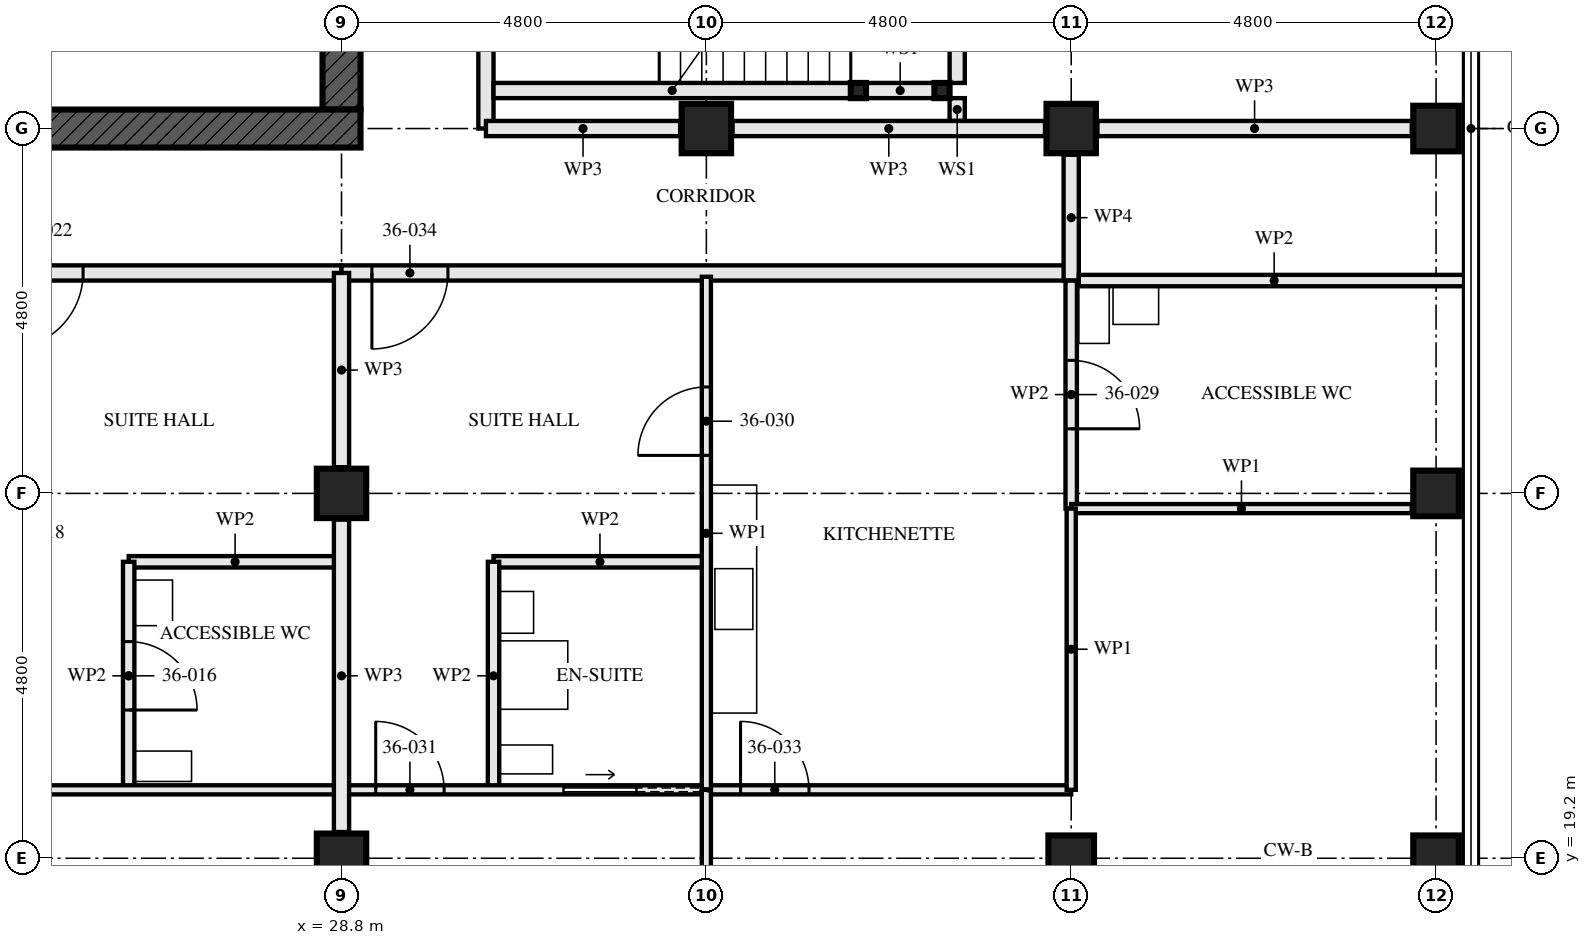
"""IFC4 building model, lengths in metres.
Left out: names, types, materials, properties, quantities, classifications, styles, units other than length and angle.
Written with IfcOpenShell. Run it as: python <this file> out.ifc"""

import sys

from ifc_helpers import new_model, si_unit, direction, frame, frame_2d, origin, origin_2d, place, context, subcontext, project, spatial, rectangle, hollow_rectangle, extrude, element, fill, save


model = new_model("IFC4")
c1 = context("Model", 3, precision=1e-05, world=origin(), true_north=direction((0.0, 1.0)))
c2 = subcontext(c1, "Body", "Model", "MODEL_VIEW")
j1 = project(units=[si_unit("LENGTHUNIT", "METRE"), si_unit("PLANEANGLEUNIT", "RADIAN")], contexts=[c1])
p1 = place(None, origin())
s1 = spatial("IfcSite", under=j1, at=p1, CompositionType="ELEMENT")
p2 = place(p1, origin())
s2 = spatial("IfcBuilding", under=s1, at=p2, CompositionType="ELEMENT")
p3 = place(p2, frame((0.0, 0.0, 133.0)))
s3 = spatial("IfcBuildingStorey", under=s2, at=p3, CompositionType="ELEMENT", Elevation=133.0)
for number, where, z_axis, x_axis in (
    (1, (28.8, 19.2, 0.0), (0.0, 0.0, 1.0), (1.0, 0.0, 0.0)),
    (2, (28.8, 24.0, 0.0), (0.0, 0.0, 1.0), (1.0, 0.0, 0.0)),
    (3, (33.6, 28.8, 0.0), (0.0, 0.0, 1.0), (0.0, 1.0, 0.0)),
):
    element("IfcColumn", number, at=place(p3, frame(where, z_axis=z_axis, x_axis=x_axis)), inside=s3, PredefinedType="COLUMN", context=c2, shape_type="SweptSolid", body=[
        extrude(hollow_rectangle(XDim=0.65, YDim=0.65, WallThickness=0.05, at=origin_2d()), origin(), (0.0, 0.0, 1.0), 3.5),
    ])
p4 = place(p3, frame((38.4, 19.2, 0.0), z_axis=(0.0, 0.0, 1.0), x_axis=(0.0, 1.0, 0.0)))
e4 = element("IfcColumn", 4, at=p4, inside=s3, PredefinedType="COLUMN", context=c2, shape_type="SweptSolid", body=[
    extrude(hollow_rectangle(XDim=0.6, YDim=0.6, WallThickness=0.08, at=origin_2d()), origin(), (0.0, 0.0, 1.0), 3.5),
])
p5 = place(p3, frame((38.4, 28.8, 0.0), z_axis=(0.0, 0.0, 1.0), x_axis=(0.0, 1.0, 0.0)))
e5 = element("IfcColumn", 5, at=p5, inside=s3, PredefinedType="COLUMN", context=c2, shape_type="SweptSolid", body=[
    extrude(hollow_rectangle(XDim=0.65, YDim=0.65, WallThickness=0.05, at=origin_2d()), origin(), (0.0, 0.0, 1.0), 3.5),
])
for number, where, z_axis, x_axis in (
    (6, (43.2, 19.2, 0.0), (0.0, 0.0, 1.0), (0.0, 1.0, 0.0)),
    (7, (43.2, 24.0, 0.0), (0.0, 0.0, 1.0), (1.0, 0.0, 0.0)),
    (8, (43.2, 28.8, 0.0), (0.0, 0.0, 1.0), (0.0, 1.0, 0.0)),
):
    element("IfcColumn", number, at=place(p3, frame(where, z_axis=z_axis, x_axis=x_axis)), inside=s3, PredefinedType="COLUMN", context=c2, shape_type="SweptSolid", body=[
        extrude(hollow_rectangle(XDim=0.6, YDim=0.6, WallThickness=0.08, at=origin_2d()), origin(), (0.0, 0.0, 1.0), 3.5),
    ])
p6 = place(p3, frame((14.15, 28.8, -0.17), z_axis=(0.0, 0.0, 1.0), x_axis=(1.0, 0.0, 0.0)))
e9 = element("IfcWall", 9, at=p6, inside=s3, PredefinedType="SHEAR", context=c2, shape_type="SweptSolid", body=[
    extrude(rectangle(XDim=14.9, YDim=0.5, at=frame_2d((7.45, 0.0))), origin(), (0.0, 0.0, 1.0), 3.42),
])
p7 = place(p6, frame((6.85, 0.0, 0.17)))
e10 = element("IfcOpeningElement", 10, at=p7, cuts=e9, PredefinedType="OPENING", context=c2, shape_type="SweptSolid", body=[
    extrude(rectangle(XDim=1.2, YDim=2.1, at=frame_2d((0.6, 1.05))), frame((0.0, 0.26, 0.0), z_axis=(0.0, -1.0, 0.0), x_axis=(1.0, 0.0, 0.0)), (0.0, 0.0, 1.0), 0.521),
])
p8 = place(p3, frame((28.8, 29.05, -0.17), z_axis=(0.0, 0.0, 1.0), x_axis=(0.0, 1.0, 0.0)))
e11 = element("IfcWall", 11, at=p8, inside=s3, PredefinedType="SHEAR", context=c2, shape_type="SweptSolid", body=[
    extrude(rectangle(XDim=13.9, YDim=0.5, at=frame_2d((6.95, 0.0))), origin(), (0.0, 0.0, 1.0), 3.42),
])
p9 = place(p8, frame((6.35, 0.0, 0.17)))
e12 = element("IfcOpeningElement", 12, at=p9, cuts=e11, PredefinedType="OPENING", context=c2, shape_type="SweptSolid", body=[
    extrude(rectangle(XDim=1.2, YDim=2.1, at=frame_2d((0.6, 1.05))), frame((0.0, 0.26, 0.0), z_axis=(0.0, -1.0, 0.0), x_axis=(1.0, 0.0, 0.0)), (0.0, 0.0, 1.0), 0.521),
])
for number, where, z_axis, x_axis in (
    (13, (36.7, 29.3, 0.0), (0.0, 0.0, 1.0), (1.0, 0.0, 0.0)),
    (14, (35.6, 29.3, 0.0), (0.0, 0.0, 1.0), (1.0, 0.0, 0.0)),
):
    element("IfcColumn", number, at=place(p3, frame(where, z_axis=z_axis, x_axis=x_axis)), inside=s3, PredefinedType="COLUMN", context=c2, shape_type="SweptSolid", body=[
        extrude(hollow_rectangle(XDim=0.2, YDim=0.2, WallThickness=0.008, at=origin_2d()), origin(), (0.0, 0.0, 1.0), 3.25),
    ])
p10 = place(p3, frame((26.0, 20.1, 0.0), z_axis=(0.0, 0.0, 1.0), x_axis=(0.0, 1.0, 0.0)))
e15 = element("IfcWall", 15, at=p10, inside=s3, PredefinedType="PARTITIONING", context=c2, shape_type="SweptSolid", body=[
    extrude(rectangle(XDim=3.0, YDim=0.15, at=frame_2d((1.5, 0.0))), origin(), (0.0, 0.0, 1.0), 3.25),
])
p11 = place(p10, frame((1.05, 0.0, 0.0)))
e16 = element("IfcOpeningElement", 16, at=p11, cuts=e15, PredefinedType="OPENING", context=c2, shape_type="SweptSolid", body=[
    extrude(rectangle(XDim=0.9, YDim=2.1, at=frame_2d((0.45, 1.05))), frame((0.0, 0.085, 0.0), z_axis=(0.0, -1.0, 0.0), x_axis=(1.0, 0.0, 0.0)), (0.0, 0.0, 1.0), 0.171),
])
p12 = place(p3, frame((26.0, 23.1, 0.0), z_axis=(0.0, 0.0, 1.0), x_axis=(1.0, 0.0, 0.0)))
e17 = element("IfcWall", 17, at=p12, inside=s3, PredefinedType="PARTITIONING", context=c2, shape_type="SweptSolid", body=[
    extrude(rectangle(XDim=2.8, YDim=0.15, at=frame_2d((1.4, 0.0))), origin(), (0.0, 0.0, 1.0), 3.25),
])
p13 = place(p3, frame((24.0, 20.1, 0.0), z_axis=(0.0, 0.0, 1.0), x_axis=(1.0, 0.0, 0.0)))
e18 = element("IfcWall", 18, at=p13, inside=s3, PredefinedType="PARTITIONING", context=c2, shape_type="SweptSolid", body=[
    extrude(rectangle(XDim=4.8, YDim=0.12, at=frame_2d((2.4, 0.0))), origin(), (0.0, 0.0, 1.0), 3.25),
])
p14 = place(p3, frame((13.96, 26.9, 0.0), z_axis=(0.0, 0.0, 1.0), x_axis=(1.0, 0.0, 0.0)))
e19 = element("IfcWall", 19, at=p14, inside=s3, PredefinedType="PARTITIONING", context=c2, shape_type="SweptSolid", body=[
    extrude(rectangle(XDim=14.84, YDim=0.2, at=frame_2d((7.42, 0.0))), origin(), (0.0, 0.0, 1.0), 2.04),
])
p15 = place(p14, frame((1.84, 0.0, 0.0)))
e20 = element("IfcOpeningElement", 20, at=p15, cuts=e19, PredefinedType="OPENING", context=c2, shape_type="SweptSolid", body=[
    extrude(rectangle(XDim=1.0, YDim=2.0, at=frame_2d((0.5, 1.0))), frame((0.0, 0.111, 0.0), z_axis=(0.0, -1.0, 0.0), x_axis=(1.0, 0.0, 0.0)), (0.0, 0.0, 1.0), 0.221),
])
p16 = place(p14, frame((10.44, 0.0, 0.0)))
e21 = element("IfcOpeningElement", 21, at=p16, cuts=e19, PredefinedType="OPENING", context=c2, shape_type="SweptSolid", body=[
    extrude(rectangle(XDim=1.0, YDim=2.0, at=frame_2d((0.5, 1.0))), frame((0.0, 0.111, 0.0), z_axis=(0.0, -1.0, 0.0), x_axis=(1.0, 0.0, 0.0)), (0.0, 0.0, 1.0), 0.221),
])
p17 = place(p3, frame((30.8, 20.1, 0.0), z_axis=(0.0, 0.0, 1.0), x_axis=(0.0, 1.0, 0.0)))
e22 = element("IfcWall", 22, at=p17, inside=s3, PredefinedType="PARTITIONING", context=c2, shape_type="SweptSolid", body=[
    extrude(rectangle(XDim=3.0, YDim=0.15, at=frame_2d((1.5, 0.0))), origin(), (0.0, 0.0, 1.0), 3.25),
])
p18 = place(p3, frame((30.8, 23.1, 0.0), z_axis=(0.0, 0.0, 1.0), x_axis=(1.0, 0.0, 0.0)))
e23 = element("IfcWall", 23, at=p18, inside=s3, PredefinedType="PARTITIONING", context=c2, shape_type="SweptSolid", body=[
    extrude(rectangle(XDim=2.8, YDim=0.15, at=frame_2d((1.4, 0.0))), origin(), (0.0, 0.0, 1.0), 3.25),
])
p19 = place(p3, frame((38.4, 23.8, 0.0), z_axis=(0.0, 0.0, 1.0), x_axis=(0.0, 1.0, 0.0)))
e24 = element("IfcWall", 24, at=p19, inside=s3, PredefinedType="PARTITIONING", context=c2, shape_type="SweptSolid", body=[
    extrude(rectangle(XDim=3.0, YDim=0.15, at=frame_2d((1.5, 0.0))), origin(), (0.0, 0.0, 1.0), 2.04),
])
p20 = place(p19, frame((1.05, 0.0, 0.0)))
e25 = element("IfcOpeningElement", 25, at=p20, cuts=e24, PredefinedType="OPENING", context=c2, shape_type="SweptSolid", body=[
    extrude(rectangle(XDim=0.9, YDim=2.0, at=frame_2d((0.45, 1.0))), frame((0.0, 0.085, 0.0), z_axis=(0.0, -1.0, 0.0), x_axis=(1.0, 0.0, 0.0)), (0.0, 0.0, 1.0), 0.171),
])
p21 = place(p3, frame((33.6, 20.1, 0.0), z_axis=(0.0, 0.0, 1.0), x_axis=(0.0, 1.0, 0.0)))
e26 = element("IfcWall", 26, at=p21, inside=s3, PredefinedType="PARTITIONING", context=c2, shape_type="SweptSolid", body=[
    extrude(rectangle(XDim=6.75, YDim=0.12, at=frame_2d((3.375, 0.0))), origin(), (0.0, 0.0, 1.0), 2.04),
])
p22 = place(p21, frame((4.4, 0.0, 0.0)))
e27 = element("IfcOpeningElement", 27, at=p22, cuts=e26, PredefinedType="OPENING", context=c2, shape_type="SweptSolid", body=[
    extrude(rectangle(XDim=0.9, YDim=2.0, at=frame_2d((0.45, 1.0))), frame((0.0, 0.071, 0.0), z_axis=(0.0, -1.0, 0.0), x_axis=(1.0, 0.0, 0.0)), (0.0, 0.0, 1.0), 0.141),
])
p23 = place(p3, frame((28.8, 20.1, 0.0), z_axis=(0.0, 0.0, 1.0), x_axis=(1.0, 0.0, 0.0)))
e28 = element("IfcWall", 28, at=p23, inside=s3, PredefinedType="PARTITIONING", context=c2, shape_type="SweptSolid", body=[
    extrude(rectangle(XDim=4.8, YDim=0.12, at=frame_2d((2.4, 0.0))), origin(), (0.0, 0.0, 1.0), 3.25),
])
p24 = place(p23, frame((0.45, 0.0, 0.0)))
e29 = element("IfcOpeningElement", 29, at=p24, cuts=e28, PredefinedType="OPENING", context=c2, shape_type="SweptSolid", body=[
    extrude(rectangle(XDim=0.9, YDim=2.1, at=frame_2d((0.45, 1.05))), frame((0.0, 0.071, 0.0), z_axis=(0.0, -1.0, 0.0), x_axis=(1.0, 0.0, 0.0)), (0.0, 0.0, 1.0), 0.141),
])
p25 = place(p23, frame((2.925, 0.0, 0.0)))
e30 = element("IfcOpeningElement", 30, at=p25, cuts=e28, PredefinedType="OPENING", context=c2, shape_type="SweptSolid", body=[
    extrude(rectangle(XDim=0.95, YDim=2.1, at=frame_2d((0.475, 1.05))), frame((0.0, 0.071, 0.0), z_axis=(0.0, -1.0, 0.0), x_axis=(1.0, 0.0, 0.0)), (0.0, 0.0, 1.0), 0.141),
])
p26 = place(p3, frame((33.6, 20.1, 0.0), z_axis=(0.0, 0.0, 1.0), x_axis=(1.0, 0.0, 0.0)))
e31 = element("IfcWall", 31, at=p26, inside=s3, PredefinedType="PARTITIONING", context=c2, shape_type="SweptSolid", body=[
    extrude(rectangle(XDim=4.8, YDim=0.12, at=frame_2d((2.4, 0.0))), origin(), (0.0, 0.0, 1.0), 3.25),
])
p27 = place(p26, frame((0.45, 0.0, 0.0)))
e32 = element("IfcOpeningElement", 32, at=p27, cuts=e31, PredefinedType="OPENING", context=c2, shape_type="SweptSolid", body=[
    extrude(rectangle(XDim=0.9, YDim=2.1, at=frame_2d((0.45, 1.05))), frame((0.0, 0.071, 0.0), z_axis=(0.0, -1.0, 0.0), x_axis=(1.0, 0.0, 0.0)), (0.0, 0.0, 1.0), 0.141),
])
p28 = place(p3, frame((38.4, 23.8, 0.0), z_axis=(0.0, 0.0, 1.0), x_axis=(1.0, 0.0, 0.0)))
e33 = element("IfcWall", 33, at=p28, inside=s3, PredefinedType="PARTITIONING", context=c2, shape_type="SweptSolid", body=[
    extrude(rectangle(XDim=4.48, YDim=0.12, at=frame_2d((2.24, 0.0))), origin(), (0.0, 0.0, 1.0), 2.04),
])
p29 = place(p3, frame((33.6, 14.72, 0.0), z_axis=(0.0, 0.0, 1.0), x_axis=(0.0, 1.0, 0.0)))
e34 = element("IfcWall", 34, at=p29, inside=s3, PredefinedType="PARTITIONING", context=c2, shape_type="SweptSolid", body=[
    extrude(rectangle(XDim=5.38, YDim=0.12, at=frame_2d((2.69, 0.0))), origin(), (0.0, 0.0, 1.0), 2.24),
])
p30 = place(p3, frame((38.4, 20.1, 0.0), z_axis=(0.0, 0.0, 1.0), x_axis=(0.0, 1.0, 0.0)))
e35 = element("IfcWall", 35, at=p30, inside=s3, PredefinedType="PARTITIONING", context=c2, shape_type="SweptSolid", body=[
    extrude(rectangle(XDim=3.7, YDim=0.12, at=frame_2d((1.85, 0.0))), origin(), (0.0, 0.0, 1.0), 3.25),
])
p31 = place(p3, frame((28.8, 26.9, 0.0), z_axis=(0.0, 0.0, 1.0), x_axis=(1.0, 0.0, 0.0)))
e36 = element("IfcWall", 36, at=p31, inside=s3, PredefinedType="PARTITIONING", context=c2, shape_type="SweptSolid", body=[
    extrude(rectangle(XDim=9.6, YDim=0.2, at=frame_2d((4.8, 0.0))), origin(), (0.0, 0.0, 1.0), 3.25),
])
p32 = place(p31, frame((0.4, 0.0, 0.0)))
e37 = element("IfcOpeningElement", 37, at=p32, cuts=e36, PredefinedType="OPENING", context=c2, shape_type="SweptSolid", body=[
    extrude(rectangle(XDim=1.0, YDim=2.1, at=frame_2d((0.5, 1.05))), frame((0.0, 0.111, 0.0), z_axis=(0.0, -1.0, 0.0), x_axis=(1.0, 0.0, 0.0)), (0.0, 0.0, 1.0), 0.221),
])
p33 = place(p3, frame((38.4, 26.8, 0.0), z_axis=(0.0, 0.0, 1.0), x_axis=(0.0, 1.0, 0.0)))
e38 = element("IfcWall", 38, at=p33, inside=s3, PredefinedType="PARTITIONING", context=c2, shape_type="SweptSolid", body=[
    extrude(rectangle(XDim=1.655, YDim=0.2, at=frame_2d((0.828, 0.0))), origin(), (0.0, 0.0, 1.0), 3.25),
])
p34 = place(p3, frame((36.6, 29.3, 0.0), z_axis=(0.0, 0.0, 1.0), x_axis=(-1.0, 0.0, 0.0)))
e39 = element("IfcWall", 39, at=p34, inside=s3, PredefinedType="SOLIDWALL", context=c2, shape_type="SweptSolid", body=[
    extrude(rectangle(XDim=0.9, YDim=0.2, at=frame_2d((0.45, 0.0))), origin(), (0.0, 0.0, 1.0), 2.94),
])
p35 = place(p3, frame((35.5, 29.3, 0.0), z_axis=(0.0, 0.0, 1.0), x_axis=(-1.0, 0.0, 0.0)))
e40 = element("IfcWall", 40, at=p35, inside=s3, PredefinedType="SOLIDWALL", context=c2, shape_type="SweptSolid", body=[
    extrude(rectangle(XDim=4.7, YDim=0.2, at=frame_2d((2.35, 0.0))), origin(), (0.0, 0.0, 1.0), 2.94),
])
p36 = place(p3, frame((36.9, 28.9, 0.0), z_axis=(0.0, 0.0, 1.0), x_axis=(0.0, 1.0, 0.0)))
e41 = element("IfcWall", 41, at=p36, inside=s3, PredefinedType="SOLIDWALL", context=c2, shape_type="SweptSolid", body=[
    extrude(rectangle(XDim=0.3, YDim=0.2, at=frame_2d((0.15, 0.0))), origin(), (0.0, 0.0, 1.0), 3.25),
])
p37 = place(p3, frame((36.9, 29.4, 0.0), z_axis=(0.0, 0.0, 1.0), x_axis=(0.0, 1.0, 0.0)))
e42 = element("IfcWall", 42, at=p37, inside=s3, PredefinedType="SOLIDWALL", context=c2, shape_type="SweptSolid", body=[
    extrude(rectangle(XDim=2.6, YDim=0.2, at=frame_2d((1.3, 0.0))), origin(), (0.0, 0.0, 1.0), 3.25),
])
p38 = place(p3, frame((30.7, 28.8, 0.0), z_axis=(0.0, 0.0, 1.0), x_axis=(0.0, 1.0, 0.0)))
e43 = element("IfcWall", 43, at=p38, inside=s3, PredefinedType="PARTITIONING", context=c2, shape_type="SweptSolid", body=[
    extrude(rectangle(XDim=14.84, YDim=0.2, at=frame_2d((7.42, 0.0))), origin(), (0.0, 0.0, 1.0), 2.04),
])
p39 = place(p38, frame((1.4, 0.0, 0.0)))
e44 = element("IfcOpeningElement", 44, at=p39, cuts=e43, PredefinedType="OPENING", context=c2, shape_type="SweptSolid", body=[
    extrude(rectangle(XDim=1.0, YDim=2.0, at=frame_2d((0.5, 1.0))), frame((0.0, 0.111, 0.0), z_axis=(0.0, -1.0, 0.0), x_axis=(1.0, 0.0, 0.0)), (0.0, 0.0, 1.0), 0.221),
])
p40 = place(p38, frame((4.1, 0.0, 0.0)))
e45 = element("IfcOpeningElement", 45, at=p40, cuts=e43, PredefinedType="OPENING", context=c2, shape_type="SweptSolid", body=[
    extrude(rectangle(XDim=1.0, YDim=2.0, at=frame_2d((0.5, 1.0))), frame((0.0, 0.111, 0.0), z_axis=(0.0, -1.0, 0.0), x_axis=(1.0, 0.0, 0.0)), (0.0, 0.0, 1.0), 0.221),
])
p41 = place(p38, frame((5.975, 0.0, 0.0)))
e46 = element("IfcOpeningElement", 46, at=p41, cuts=e43, PredefinedType="OPENING", context=c2, shape_type="SweptSolid", body=[
    extrude(rectangle(XDim=1.0, YDim=2.0, at=frame_2d((0.5, 1.0))), frame((0.0, 0.111, 0.0), z_axis=(0.0, -1.0, 0.0), x_axis=(1.0, 0.0, 0.0)), (0.0, 0.0, 1.0), 0.221),
])
p42 = place(p38, frame((13.0, 0.0, 0.0)))
e47 = element("IfcOpeningElement", 47, at=p42, cuts=e43, PredefinedType="OPENING", context=c2, shape_type="SweptSolid", body=[
    extrude(rectangle(XDim=1.0, YDim=2.0, at=frame_2d((0.5, 1.0))), frame((0.0, 0.111, 0.0), z_axis=(0.0, -1.0, 0.0), x_axis=(1.0, 0.0, 0.0)), (0.0, 0.0, 1.0), 0.221),
])
p43 = place(p3, frame((28.8, 19.545, 0.0), z_axis=(0.0, 0.0, 1.0), x_axis=(0.0, 1.0, 0.0)))
e48 = element("IfcWall", 48, at=p43, inside=s3, PredefinedType="PARTITIONING", context=c2, shape_type="SweptSolid", body=[
    extrude(rectangle(XDim=4.11, YDim=0.2, at=frame_2d((2.055, 0.0))), origin(), (0.0, 0.0, 1.0), 2.04),
])
p44 = place(p3, frame((28.8, 24.345, 0.0), z_axis=(0.0, 0.0, 1.0), x_axis=(0.0, 1.0, 0.0)))
e49 = element("IfcWall", 49, at=p44, inside=s3, PredefinedType="PARTITIONING", context=c2, shape_type="SweptSolid", body=[
    extrude(rectangle(XDim=2.555, YDim=0.2, at=frame_2d((1.277, 0.0))), origin(), (0.0, 0.0, 1.0), 2.04),
])
p45 = place(p3, frame((42.88, 28.8, 0.0), z_axis=(0.0, 0.0, 1.0), x_axis=(-1.0, 0.0, 0.0)))
e50 = element("IfcWall", 50, at=p45, inside=s3, PredefinedType="PARTITIONING", context=c2, shape_type="SweptSolid", body=[
    extrude(rectangle(XDim=4.135, YDim=0.2, at=frame_2d((2.067, 0.0))), origin(), (0.0, 0.0, 1.0), 2.04),
])
p46 = place(p3, frame((38.055, 28.8, 0.0), z_axis=(0.0, 0.0, 1.0), x_axis=(-1.0, 0.0, 0.0)))
e51 = element("IfcWall", 51, at=p46, inside=s3, PredefinedType="PARTITIONING", context=c2, shape_type="SweptSolid", body=[
    extrude(rectangle(XDim=4.11, YDim=0.2, at=frame_2d((2.055, 0.0))), origin(), (0.0, 0.0, 1.0), 2.04),
])
p47 = place(p3, frame((33.255, 28.8, 0.0), z_axis=(0.0, 0.0, 1.0), x_axis=(-1.0, 0.0, 0.0)))
e52 = element("IfcWall", 52, at=p47, inside=s3, PredefinedType="PARTITIONING", context=c2, shape_type="SweptSolid", body=[
    extrude(rectangle(XDim=2.555, YDim=0.2, at=frame_2d((1.277, 0.0))), origin(), (0.0, 0.0, 1.0), 2.04),
])
p48 = place(p3, frame((38.5, 26.8, 0.0), z_axis=(0.0, 0.0, 1.0), x_axis=(1.0, 0.0, 0.0)))
e53 = element("IfcWall", 53, at=p48, inside=s3, PredefinedType="PARTITIONING", context=c2, shape_type="SweptSolid", body=[
    extrude(rectangle(XDim=5.14, YDim=0.15, at=frame_2d((2.57, 0.0))), origin(), (0.0, 0.0, 1.0), 2.04),
])
p49 = place(p11, frame((0.9, 0.0, 0.0), z_axis=(0.0, 0.0, 1.0), x_axis=(-1.0, 0.0, 0.0)))
e54 = element("IfcDoor", 54, at=p49, inside=s3, OperationType="SINGLE_SWING_LEFT", PredefinedType="DOOR", context=c2, shape_type="SweptSolid", body=[
    extrude(rectangle(XDim=0.9, YDim=2.1, at=frame_2d((0.45, 1.05))), frame((0.0, 0.022, 0.0), z_axis=(0.0, -1.0, 0.0), x_axis=(1.0, 0.0, 0.0)), (0.0, 0.0, 1.0), 0.044),
])
fill(e16, e54)
p50 = place(p16, frame((1.0, 0.0, 0.0), z_axis=(0.0, 0.0, 1.0), x_axis=(-1.0, 0.0, 0.0)))
e55 = element("IfcDoor", 55, at=p50, inside=s3, OperationType="SINGLE_SWING_LEFT", PredefinedType="DOOR", context=c2, shape_type="SweptSolid", body=[
    extrude(rectangle(XDim=1.0, YDim=2.0, at=frame_2d((0.5, 1.0))), frame((0.0, 0.027, 0.0), z_axis=(0.0, -1.0, 0.0), x_axis=(1.0, 0.0, 0.0)), (0.0, 0.0, 1.0), 0.054),
])
fill(e21, e55)
p51 = place(p20, frame((0.9, 0.0, 0.0), z_axis=(0.0, 0.0, 1.0), x_axis=(-1.0, 0.0, 0.0)))
e56 = element("IfcDoor", 56, at=p51, inside=s3, OperationType="SINGLE_SWING_LEFT", PredefinedType="DOOR", context=c2, shape_type="SweptSolid", body=[
    extrude(rectangle(XDim=0.9, YDim=2.0, at=frame_2d((0.45, 1.0))), frame((0.0, 0.022, 0.0), z_axis=(0.0, -1.0, 0.0), x_axis=(1.0, 0.0, 0.0)), (0.0, 0.0, 1.0), 0.044),
])
fill(e25, e56)
p52 = place(p22, origin())
e57 = element("IfcDoor", 57, at=p52, inside=s3, OperationType="SINGLE_SWING_RIGHT", PredefinedType="DOOR", context=c2, shape_type="SweptSolid", body=[
    extrude(rectangle(XDim=0.9, YDim=2.0, at=frame_2d((0.45, 1.0))), frame((0.0, 0.022, 0.0), z_axis=(0.0, -1.0, 0.0), x_axis=(1.0, 0.0, 0.0)), (0.0, 0.0, 1.0), 0.044),
])
fill(e27, e57)
p53 = place(p24, origin())
e58 = element("IfcDoor", 58, at=p53, inside=s3, OperationType="SINGLE_SWING_RIGHT", PredefinedType="DOOR", context=c2, shape_type="SweptSolid", body=[
    extrude(rectangle(XDim=0.9, YDim=2.1, at=frame_2d((0.45, 1.05))), frame((0.0, 0.022, 0.0), z_axis=(0.0, -1.0, 0.0), x_axis=(1.0, 0.0, 0.0)), (0.0, 0.0, 1.0), 0.044),
])
fill(e29, e58)
p54 = place(p25, origin())
e59 = element("IfcDoor", 59, at=p54, inside=s3, OperationType="SLIDING_TO_LEFT", PredefinedType="DOOR", context=c2, shape_type="SweptSolid", body=[
    extrude(rectangle(XDim=0.95, YDim=2.1, at=frame_2d((0.475, 1.05))), frame((0.0, 0.022, 0.0), z_axis=(0.0, -1.0, 0.0), x_axis=(1.0, 0.0, 0.0)), (0.0, 0.0, 1.0), 0.044),
])
fill(e30, e59)
p55 = place(p27, origin())
e60 = element("IfcDoor", 60, at=p55, inside=s3, OperationType="SINGLE_SWING_RIGHT", PredefinedType="DOOR", context=c2, shape_type="SweptSolid", body=[
    extrude(rectangle(XDim=0.9, YDim=2.1, at=frame_2d((0.45, 1.05))), frame((0.0, 0.022, 0.0), z_axis=(0.0, -1.0, 0.0), x_axis=(1.0, 0.0, 0.0)), (0.0, 0.0, 1.0), 0.044),
])
fill(e32, e60)
p56 = place(p32, frame((1.0, 0.0, 0.0), z_axis=(0.0, 0.0, 1.0), x_axis=(-1.0, 0.0, 0.0)))
e61 = element("IfcDoor", 61, at=p56, inside=s3, OperationType="SINGLE_SWING_LEFT", PredefinedType="DOOR", context=c2, shape_type="SweptSolid", body=[
    extrude(rectangle(XDim=1.0, YDim=2.1, at=frame_2d((0.5, 1.05))), frame((0.0, 0.027, 0.0), z_axis=(0.0, -1.0, 0.0), x_axis=(1.0, 0.0, 0.0)), (0.0, 0.0, 1.0), 0.054),
])
fill(e37, e61)
save(model, sys.argv[1])
